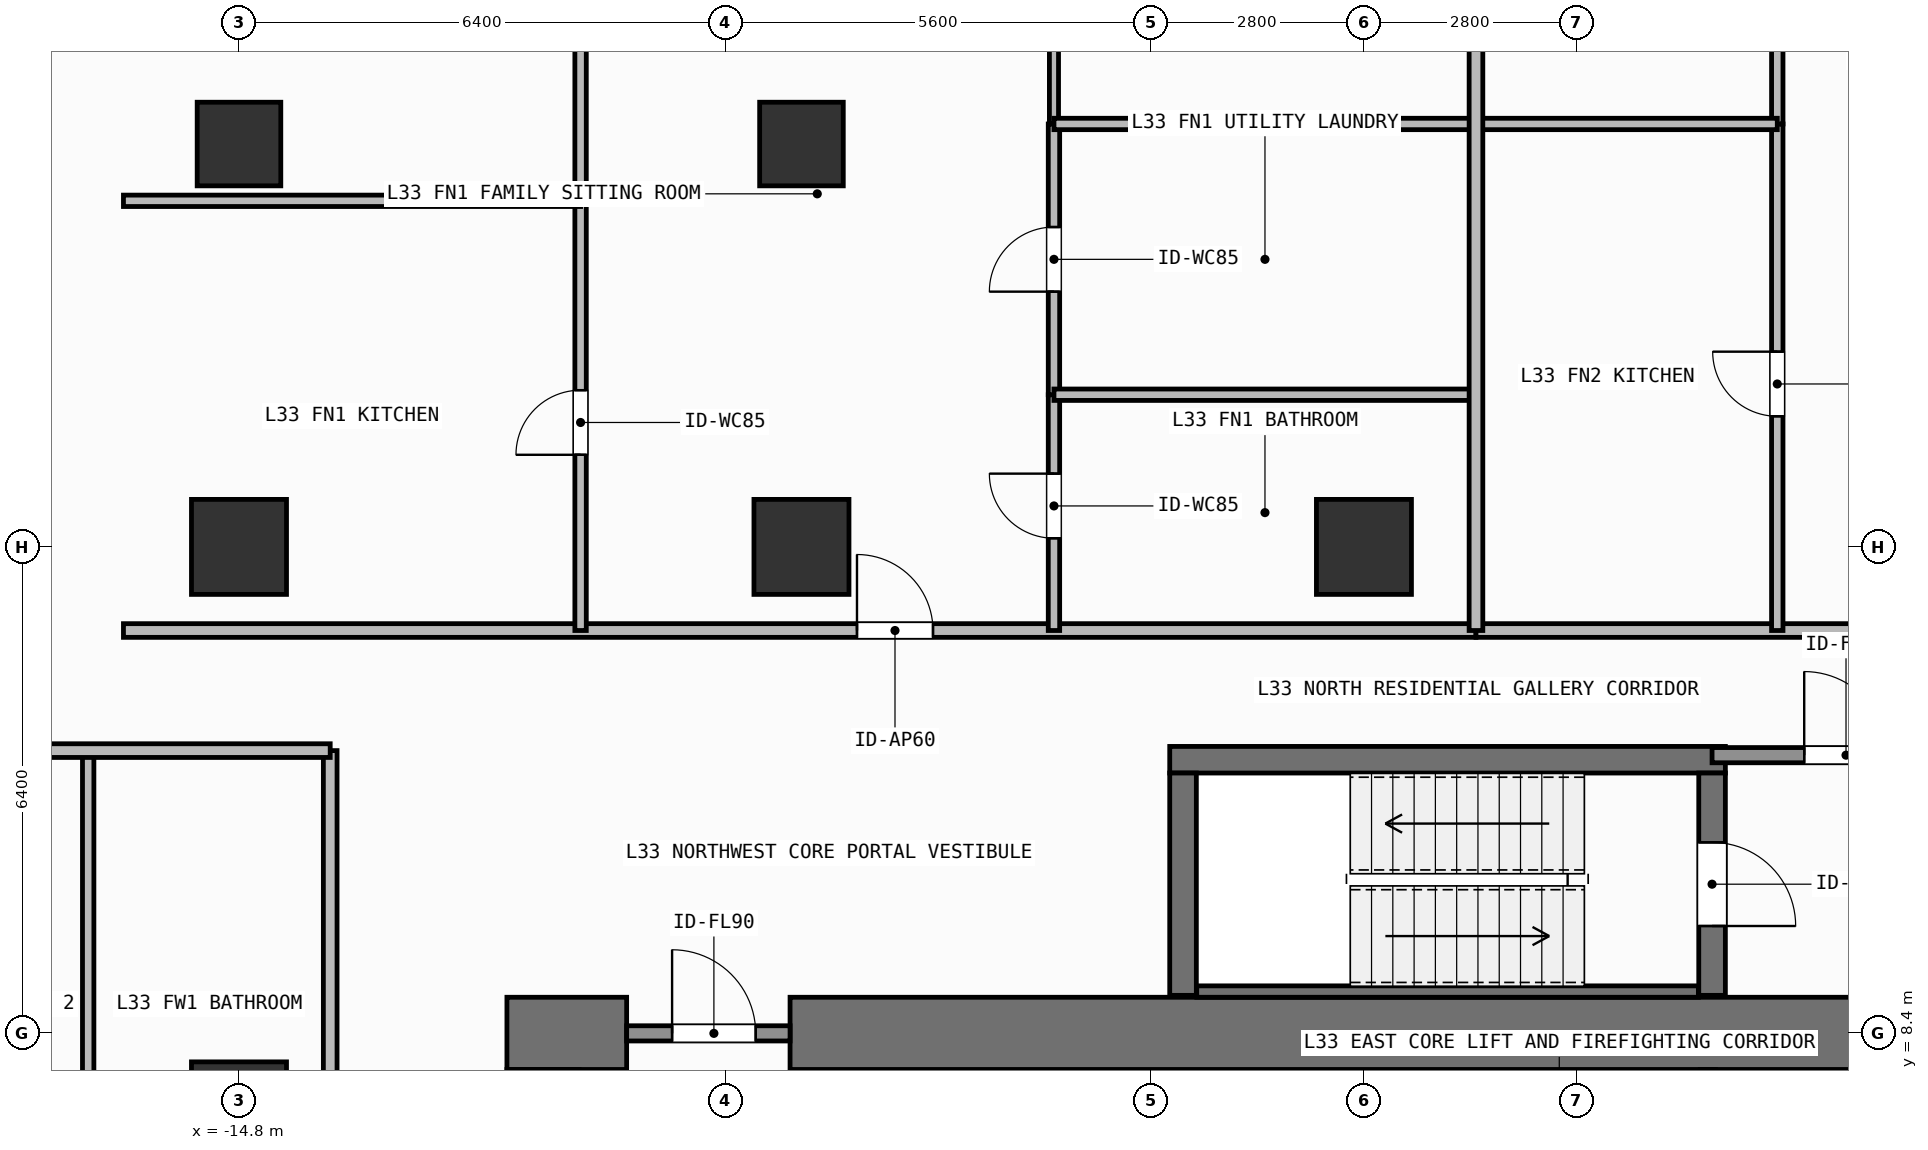
"""IFC4 building model, lengths in metres.
Left out: names, types, materials, properties, quantities, classifications, styles, units other than length and angle.
Written with IfcOpenShell. Run it as: python <this file> out.ifc"""

import sys

from ifc_helpers import new_model, si_unit, direction, frame, frame_2d, origin, origin_2d, place, context, subcontext, project, spatial, rectangle, extrude, element, fill, save


model = new_model("IFC4")
c1 = context("Model", 3, precision=1e-05, world=origin(), true_north=direction((0.0, 1.0)))
c2 = subcontext(c1, "Body", "Model", "MODEL_VIEW")
j1 = project(units=[si_unit("LENGTHUNIT", "METRE"), si_unit("PLANEANGLEUNIT", "RADIAN")], contexts=[c1])
p1 = place(None, origin())
s1 = spatial("IfcSite", under=j1, at=p1, CompositionType="ELEMENT")
p2 = place(p1, origin())
s2 = spatial("IfcBuilding", under=s1, at=p2, CompositionType="ELEMENT")
p3 = place(p2, frame((0.0, 0.0, 132.9)))
s3 = spatial("IfcBuildingStorey", under=s2, at=p3, CompositionType="ELEMENT", Elevation=132.9)
p4 = place(p3, frame((-11.275, 8.4, 0.0), z_axis=(0.0, 0.0, 1.0), x_axis=(1.0, 0.0, 0.0)))
e1 = element("IfcWall", 1, at=p4, inside=s3, PredefinedType="SHEAR", context=c2, shape_type="SweptSolid", body=[
    extrude(rectangle(XDim=1.575, YDim=0.95, at=frame_2d((0.788, 0.0))), origin(), (0.0, 0.0, 1.0), 3.9),
])
p5 = place(p3, frame((-7.55, 8.4, 0.0), z_axis=(0.0, 0.0, 1.0), x_axis=(1.0, 0.0, 0.0)))
e2 = element("IfcWall", 2, at=p5, inside=s3, PredefinedType="SHEAR", context=c2, shape_type="SweptSolid", body=[
    extrude(rectangle(XDim=16.425, YDim=0.95, at=frame_2d((8.212, 0.0))), origin(), (0.0, 0.0, 1.0), 3.9),
])
p6 = place(p3, frame((-10.8, -7.925, 0.0), z_axis=(0.0, 0.0, 1.0), x_axis=(0.0, 1.0, 0.0)))
e3 = element("IfcWall", 3, at=p6, inside=s3, PredefinedType="SHEAR", context=c2, shape_type="SweptSolid", body=[
    extrude(rectangle(XDim=15.85, YDim=0.95, at=frame_2d((7.925, 0.0))), origin(), (0.0, 0.0, 1.0), 3.9),
])
p7 = place(p3, frame((-2.555, 12.0, 0.0), z_axis=(0.0, 0.0, 1.0), x_axis=(1.0, 0.0, 0.0)))
e4 = element("IfcWall", 4, at=p7, inside=s3, PredefinedType="SHEAR", context=c2, shape_type="SweptSolid", body=[
    extrude(rectangle(XDim=7.31, YDim=0.35, at=frame_2d((3.655, 0.0))), origin(), (0.0, 0.0, 1.0), 3.9),
])
p8 = place(p3, frame((-2.2, 8.95, 0.0), z_axis=(0.0, 0.0, 1.0), x_axis=(1.0, 0.0, 0.0)))
e5 = element("IfcWall", 5, at=p8, inside=s3, PredefinedType="SHEAR", context=c2, shape_type="SweptSolid", body=[
    extrude(rectangle(XDim=6.6, YDim=0.15, at=frame_2d((3.3, 0.0))), origin(), (0.0, 0.0, 1.0), 3.9),
])
p9 = place(p3, frame((-2.38, 8.9, 0.0), z_axis=(0.0, 0.0, 1.0), x_axis=(0.0, 1.0, 0.0)))
e6 = element("IfcWall", 6, at=p9, inside=s3, PredefinedType="SHEAR", context=c2, shape_type="SweptSolid", body=[
    extrude(rectangle(XDim=2.925, YDim=0.35, at=frame_2d((1.462, 0.0))), origin(), (0.0, 0.0, 1.0), 3.9),
])
p10 = place(p3, frame((4.58, 11.825, 0.0), z_axis=(0.0, 0.0, 1.0), x_axis=(0.0, -1.0, 0.0)))
e7 = element("IfcWall", 7, at=p10, inside=s3, PredefinedType="SHEAR", context=c2, shape_type="SweptSolid", body=[
    extrude(rectangle(XDim=2.925, YDim=0.35, at=frame_2d((1.462, 0.0))), origin(), (0.0, 0.0, 1.0), 3.9),
])
p11 = place(p10, frame((0.913, 0.0, 0.0)))
e8 = element("IfcOpeningElement", 8, at=p11, cuts=e7, PredefinedType="OPENING", context=c2, shape_type="SweptSolid", body=[
    extrude(rectangle(XDim=1.1, YDim=2.15, at=frame_2d((0.55, 1.075))), frame((0.0, 0.185, 0.0), z_axis=(0.0, -1.0, 0.0), x_axis=(1.0, 0.0, 0.0)), (0.0, 0.0, 1.0), 0.37),
])
for number, where, z_axis, x_axis in (
    (9, (-14.8, 14.8, 0.0), (0.0, 0.0, 1.0), (1.0, 0.0, 0.0)),
    (10, (-7.4, 14.8, 0.0), (0.0, 0.0, 1.0), (1.0, 0.0, 0.0)),
    (11, (0.0, 14.8, 0.0), (0.0, 0.0, 1.0), (1.0, 0.0, 0.0)),
    (12, (-14.8, 7.4, 0.0), (0.0, 0.0, 1.0), (1.0, 0.0, 0.0)),
):
    element("IfcColumn", number, at=place(p3, frame(where, z_axis=z_axis, x_axis=x_axis)), inside=s3, PredefinedType="COLUMN", context=c2, shape_type="SweptSolid", body=[
        extrude(rectangle(XDim=1.25, YDim=1.25, at=origin_2d()), origin(), (0.0, 0.0, 1.0), 3.9),
    ])
for number, where, z_axis, x_axis in (
    (13, (-14.8, 20.1, 0.0), (0.0, 0.0, 1.0), (1.0, 0.0, 0.0)),
    (14, (-7.4, 20.1, 0.0), (0.0, 0.0, 1.0), (1.0, 0.0, 0.0)),
):
    element("IfcColumn", number, at=place(p3, frame(where, z_axis=z_axis, x_axis=x_axis)), inside=s3, PredefinedType="COLUMN", context=c2, shape_type="SweptSolid", body=[
        extrude(rectangle(XDim=1.1, YDim=1.1, at=origin_2d()), origin(), (0.0, 0.0, 1.0), 3.9),
    ])
p12 = place(p3, frame((4.525, 5.825, 0.0), z_axis=(0.0, 0.0, 1.0), x_axis=(0.0, 1.0, 0.0)))
e15 = element("IfcWall", 15, at=p12, inside=s3, PredefinedType="SHEAR", context=c2, shape_type="SweptSolid", body=[
    extrude(rectangle(XDim=2.1, YDim=0.2, at=frame_2d((1.05, 0.0))), origin(), (0.0, 0.0, 1.0), 3.62),
])
p13 = place(p12, frame((0.425, 0.0, 0.0)))
e16 = element("IfcOpeningElement", 16, at=p13, cuts=e15, PredefinedType="OPENING", context=c2, shape_type="SweptSolid", body=[
    extrude(rectangle(XDim=1.1, YDim=2.2, at=frame_2d((0.55, 1.1))), frame((0.0, 0.11, 0.0), z_axis=(0.0, -1.0, 0.0), x_axis=(1.0, 0.0, 0.0)), (0.0, 0.0, 1.0), 0.22),
])
p14 = place(p3, frame((4.58, 12.06, 0.0), z_axis=(0.0, 0.0, 1.0), x_axis=(1.0, 0.0, 0.0)))
e17 = element("IfcWall", 17, at=p14, inside=s3, PredefinedType="SOLIDWALL", context=c2, shape_type="SweptSolid", body=[
    extrude(rectangle(XDim=3.7, YDim=0.2, at=frame_2d((1.85, 0.0))), origin(), (0.0, 0.0, 1.0), 3.62),
])
p15 = place(p14, frame((1.212, 0.0, 0.0)))
e18 = element("IfcOpeningElement", 18, at=p15, cuts=e17, PredefinedType="OPENING", context=c2, shape_type="SweptSolid", body=[
    extrude(rectangle(XDim=1.1, YDim=2.15, at=frame_2d((0.55, 1.075))), frame((0.0, 0.11, 0.0), z_axis=(0.0, -1.0, 0.0), x_axis=(1.0, 0.0, 0.0)), (0.0, 0.0, 1.0), 0.22),
])
p16 = place(p3, frame((-9.7, 8.4, 0.0), z_axis=(0.0, 0.0, 1.0), x_axis=(1.0, 0.0, 0.0)))
e19 = element("IfcWall", 19, at=p16, inside=s3, PredefinedType="SOLIDWALL", context=c2, shape_type="SweptSolid", body=[
    extrude(rectangle(XDim=2.15, YDim=0.2, at=frame_2d((1.075, 0.0))), origin(), (0.0, 0.0, 1.0), 2.66),
])
p17 = place(p16, frame((0.598, 0.0, 0.0)))
e20 = element("IfcOpeningElement", 20, at=p17, cuts=e19, PredefinedType="OPENING", context=c2, shape_type="SweptSolid", body=[
    extrude(rectangle(XDim=1.1, YDim=2.15, at=frame_2d((0.55, 1.075))), frame((0.0, 0.11, 0.0), z_axis=(0.0, -1.0, 0.0), x_axis=(1.0, 0.0, 0.0)), (0.0, 0.0, 1.0), 0.22),
])
p18 = place(p3, frame((-16.32, 13.7, 0.0), z_axis=(0.0, 0.0, 1.0), x_axis=(1.0, 0.0, 0.0)))
e21 = element("IfcWall", 21, at=p18, inside=s3, PredefinedType="PARTITIONING", context=c2, shape_type="SweptSolid", body=[
    extrude(rectangle(XDim=17.794, YDim=0.18, at=frame_2d((8.897, 0.0))), origin(), (0.0, 0.0, 1.0), 3.62),
])
p19 = place(p18, frame((9.65, 0.0, 0.0)))
e22 = element("IfcOpeningElement", 22, at=p19, cuts=e21, PredefinedType="OPENING", context=c2, shape_type="SweptSolid", body=[
    extrude(rectangle(XDim=1.0, YDim=2.2, at=frame_2d((0.5, 1.1))), frame((0.0, 0.1, 0.0), z_axis=(0.0, -1.0, 0.0), x_axis=(1.0, 0.0, 0.0)), (0.0, 0.0, 1.0), 0.2),
])
p20 = place(p3, frame((-10.306, 13.7, 0.0), z_axis=(0.0, 0.0, 1.0), x_axis=(0.0, 1.0, 0.0)))
e23 = element("IfcWall", 23, at=p20, inside=s3, PredefinedType="PARTITIONING", context=c2, shape_type="SweptSolid", body=[
    extrude(rectangle(XDim=5.653, YDim=0.15, at=frame_2d((2.827, 0.0))), origin(), (0.0, 0.0, 1.0), 3.62),
])
p21 = place(p20, frame((2.312, 0.0, 0.0)))
e24 = element("IfcOpeningElement", 24, at=p21, cuts=e23, PredefinedType="OPENING", context=c2, shape_type="SweptSolid", body=[
    extrude(rectangle(XDim=0.85, YDim=2.1, at=frame_2d((0.425, 1.05))), frame((0.0, 0.085, 0.0), z_axis=(0.0, -1.0, 0.0), x_axis=(1.0, 0.0, 0.0)), (0.0, 0.0, 1.0), 0.17),
])
p22 = place(p3, frame((-10.306, 19.353, 0.0), z_axis=(0.0, 0.0, 1.0), x_axis=(0.0, 1.0, 0.0)))
e25 = element("IfcWall", 25, at=p22, inside=s3, PredefinedType="PARTITIONING", context=c2, shape_type="SweptSolid", body=[
    extrude(rectangle(XDim=5.837, YDim=0.15, at=frame_2d((2.918, 0.0))), origin(), (0.0, 0.0, 1.0), 3.62),
])
p23 = place(p22, frame((2.493, 0.0, 0.0)))
e26 = element("IfcOpeningElement", 26, at=p23, cuts=e25, PredefinedType="OPENING", context=c2, shape_type="SweptSolid", body=[
    extrude(rectangle(XDim=0.85, YDim=2.1, at=frame_2d((0.425, 1.05))), frame((0.0, 0.085, 0.0), z_axis=(0.0, -1.0, 0.0), x_axis=(1.0, 0.0, 0.0)), (0.0, 0.0, 1.0), 0.17),
])
p24 = place(p3, frame((-4.078, 13.7, 0.0), z_axis=(0.0, 0.0, 1.0), x_axis=(0.0, 1.0, 0.0)))
e27 = element("IfcWall", 27, at=p24, inside=s3, PredefinedType="PARTITIONING", context=c2, shape_type="SweptSolid", body=[
    extrude(rectangle(XDim=3.102, YDim=0.15, at=frame_2d((1.551, 0.0))), origin(), (0.0, 0.0, 1.0), 3.62),
])
p25 = place(p24, frame((1.214, 0.0, 0.0)))
e28 = element("IfcOpeningElement", 28, at=p25, cuts=e27, PredefinedType="OPENING", context=c2, shape_type="SweptSolid", body=[
    extrude(rectangle(XDim=0.85, YDim=2.1, at=frame_2d((0.425, 1.05))), frame((0.0, 0.085, 0.0), z_axis=(0.0, -1.0, 0.0), x_axis=(1.0, 0.0, 0.0)), (0.0, 0.0, 1.0), 0.17),
])
p26 = place(p3, frame((-4.078, 16.802, 0.0), z_axis=(0.0, 0.0, 1.0), x_axis=(0.0, 1.0, 0.0)))
e29 = element("IfcWall", 29, at=p26, inside=s3, PredefinedType="PARTITIONING", context=c2, shape_type="SweptSolid", body=[
    extrude(rectangle(XDim=3.562, YDim=0.15, at=frame_2d((1.781, 0.0))), origin(), (0.0, 0.0, 1.0), 3.62),
])
p27 = place(p26, frame((1.356, 0.0, 0.0)))
e30 = element("IfcOpeningElement", 30, at=p27, cuts=e29, PredefinedType="OPENING", context=c2, shape_type="SweptSolid", body=[
    extrude(rectangle(XDim=0.85, YDim=2.1, at=frame_2d((0.425, 1.05))), frame((0.0, 0.085, 0.0), z_axis=(0.0, -1.0, 0.0), x_axis=(1.0, 0.0, 0.0)), (0.0, 0.0, 1.0), 0.17),
])
p28 = place(p3, frame((-4.078, 20.364, 0.0), z_axis=(0.0, 0.0, 1.0), x_axis=(0.0, 1.0, 0.0)))
e31 = element("IfcWall", 31, at=p28, inside=s3, PredefinedType="PARTITIONING", context=c2, shape_type="SweptSolid", body=[
    extrude(rectangle(XDim=4.826, YDim=0.12, at=frame_2d((2.413, 0.0))), origin(), (0.0, 0.0, 1.0), 3.62),
])
p29 = place(p28, frame((1.901, 0.0, 0.0)))
e32 = element("IfcOpeningElement", 32, at=p29, cuts=e31, PredefinedType="OPENING", context=c2, shape_type="SweptSolid", body=[
    extrude(rectangle(XDim=0.85, YDim=2.1, at=frame_2d((0.425, 1.05))), frame((0.0, 0.07, 0.0), z_axis=(0.0, -1.0, 0.0), x_axis=(1.0, 0.0, 0.0)), (0.0, 0.0, 1.0), 0.14),
])
p30 = place(p3, frame((1.474, 13.7, 0.0), z_axis=(0.0, 0.0, 1.0), x_axis=(1.0, 0.0, 0.0)))
e33 = element("IfcWall", 33, at=p30, inside=s3, PredefinedType="PARTITIONING", context=c2, shape_type="SweptSolid", body=[
    extrude(rectangle(XDim=22.646, YDim=0.18, at=frame_2d((11.323, 0.0))), origin(), (0.0, 0.0, 1.0), 3.62),
])
p31 = place(p30, frame((10.196, 0.0, 0.0)))
e34 = element("IfcOpeningElement", 34, at=p31, cuts=e33, PredefinedType="OPENING", context=c2, shape_type="SweptSolid", body=[
    extrude(rectangle(XDim=1.0, YDim=2.2, at=frame_2d((0.5, 1.1))), frame((0.0, 0.1, 0.0), z_axis=(0.0, -1.0, 0.0), x_axis=(1.0, 0.0, 0.0)), (0.0, 0.0, 1.0), 0.2),
])
p32 = place(p3, frame((5.438, 13.7, 0.0), z_axis=(0.0, 0.0, 1.0), x_axis=(0.0, 1.0, 0.0)))
e35 = element("IfcWall", 35, at=p32, inside=s3, PredefinedType="PARTITIONING", context=c2, shape_type="SweptSolid", body=[
    extrude(rectangle(XDim=6.664, YDim=0.15, at=frame_2d((3.332, 0.0))), origin(), (0.0, 0.0, 1.0), 3.62),
])
p33 = place(p32, frame((2.818, 0.0, 0.0)))
e36 = element("IfcOpeningElement", 36, at=p33, cuts=e35, PredefinedType="OPENING", context=c2, shape_type="SweptSolid", body=[
    extrude(rectangle(XDim=0.85, YDim=2.1, at=frame_2d((0.425, 1.05))), frame((0.0, 0.085, 0.0), z_axis=(0.0, -1.0, 0.0), x_axis=(1.0, 0.0, 0.0)), (0.0, 0.0, 1.0), 0.17),
])
p34 = place(p3, frame((5.438, 20.364, 0.0), z_axis=(0.0, 0.0, 1.0), x_axis=(0.0, 1.0, 0.0)))
e37 = element("IfcWall", 37, at=p34, inside=s3, PredefinedType="PARTITIONING", context=c2, shape_type="SweptSolid", body=[
    extrude(rectangle(XDim=4.826, YDim=0.15, at=frame_2d((2.413, 0.0))), origin(), (0.0, 0.0, 1.0), 3.62),
])
p35 = place(p34, frame((2.946, 0.0, 0.0)))
e38 = element("IfcOpeningElement", 38, at=p35, cuts=e37, PredefinedType="OPENING", context=c2, shape_type="SweptSolid", body=[
    extrude(rectangle(XDim=0.85, YDim=2.1, at=frame_2d((0.425, 1.05))), frame((0.0, 0.085, 0.0), z_axis=(0.0, -1.0, 0.0), x_axis=(1.0, 0.0, 0.0)), (0.0, 0.0, 1.0), 0.17),
])
p36 = place(p3, frame((-13.6, -12.12, 0.0), z_axis=(0.0, 0.0, 1.0), x_axis=(0.0, 1.0, 0.0)))
e39 = element("IfcWall", 39, at=p36, inside=s3, PredefinedType="PARTITIONING", context=c2, shape_type="SweptSolid", body=[
    extrude(rectangle(XDim=24.24, YDim=0.18, at=frame_2d((12.12, 0.0))), origin(), (0.0, 0.0, 1.0), 3.62),
])
p37 = place(p36, frame((11.62, 0.0, 0.0)))
e40 = element("IfcOpeningElement", 40, at=p37, cuts=e39, PredefinedType="OPENING", context=c2, shape_type="SweptSolid", body=[
    extrude(rectangle(XDim=1.0, YDim=2.2, at=frame_2d((0.5, 1.1))), frame((0.0, 0.1, 0.0), z_axis=(0.0, -1.0, 0.0), x_axis=(1.0, 0.0, 0.0)), (0.0, 0.0, 1.0), 0.2),
])
p38 = place(p3, frame((-16.32, 19.353, 0.0), z_axis=(0.0, 0.0, 1.0), x_axis=(1.0, 0.0, 0.0)))
e41 = element("IfcWall", 41, at=p38, inside=s3, PredefinedType="PARTITIONING", context=c2, shape_type="SweptSolid", body=[
    extrude(rectangle(XDim=6.014, YDim=0.15, at=frame_2d((3.007, 0.0))), origin(), (0.0, 0.0, 1.0), 3.31),
])
p39 = place(p3, frame((-4.078, 16.802, 0.0), z_axis=(0.0, 0.0, 1.0), x_axis=(1.0, 0.0, 0.0)))
e42 = element("IfcWall", 42, at=p39, inside=s3, PredefinedType="PARTITIONING", context=c2, shape_type="SweptSolid", body=[
    extrude(rectangle(XDim=5.552, YDim=0.15, at=frame_2d((2.776, 0.0))), origin(), (0.0, 0.0, 1.0), 3.62),
])
p40 = place(p3, frame((-4.078, 20.364, 0.0), z_axis=(0.0, 0.0, 1.0), x_axis=(1.0, 0.0, 0.0)))
e43 = element("IfcWall", 43, at=p40, inside=s3, PredefinedType="PARTITIONING", context=c2, shape_type="SweptSolid", body=[
    extrude(rectangle(XDim=5.552, YDim=0.15, at=frame_2d((2.776, 0.0))), origin(), (0.0, 0.0, 1.0), 2.71),
])
p41 = place(p3, frame((1.474, 20.364, 0.0), z_axis=(0.0, 0.0, 1.0), x_axis=(1.0, 0.0, 0.0)))
e44 = element("IfcWall", 44, at=p41, inside=s3, PredefinedType="PARTITIONING", context=c2, shape_type="SweptSolid", body=[
    extrude(rectangle(XDim=3.964, YDim=0.15, at=frame_2d((1.982, 0.0))), origin(), (0.0, 0.0, 1.0), 2.71),
])
p42 = place(p3, frame((1.474, 13.7, 0.0), z_axis=(0.0, 0.0, 1.0), x_axis=(0.0, 1.0, 0.0)))
e45 = element("IfcWall", 45, at=p42, inside=s3, PredefinedType="PARTITIONING", context=c2, shape_type="SweptSolid", body=[
    extrude(rectangle(XDim=15.73, YDim=0.18, at=frame_2d((7.865, 0.0))), origin(), (0.0, 0.0, 1.0), 3.62),
])
p43 = place(p3, frame((-16.784, 5.449, 0.0), z_axis=(0.0, 0.0, 1.0), x_axis=(0.0, 1.0, 0.0)))
e46 = element("IfcWall", 46, at=p43, inside=s3, PredefinedType="PARTITIONING", context=c2, shape_type="SweptSolid", body=[
    extrude(rectangle(XDim=6.671, YDim=0.15, at=frame_2d((3.335, 0.0))), origin(), (0.0, 0.0, 1.0), 3.62),
])
p44 = place(p3, frame((-19.73, 12.12, 0.0), z_axis=(0.0, 0.0, 1.0), x_axis=(1.0, 0.0, 0.0)))
e47 = element("IfcWall", 47, at=p44, inside=s3, PredefinedType="PARTITIONING", context=c2, shape_type="SweptSolid", body=[
    extrude(rectangle(XDim=6.13, YDim=0.18, at=frame_2d((3.065, 0.0))), origin(), (0.0, 0.0, 1.0), 3.62),
])
p45 = place(p11, origin())
e48 = element("IfcDoor", 48, at=p45, inside=s3, OperationType="SINGLE_SWING_RIGHT", PredefinedType="DOOR", context=c2, shape_type="SweptSolid", body=[
    extrude(rectangle(XDim=1.1, YDim=2.15, at=frame_2d((0.55, 1.075))), frame((0.0, 0.025, 0.0), z_axis=(0.0, -1.0, 0.0), x_axis=(1.0, 0.0, 0.0)), (0.0, 0.0, 1.0), 0.05),
])
fill(e8, e48)
p46 = place(p15, origin())
e49 = element("IfcDoor", 49, at=p46, inside=s3, OperationType="SINGLE_SWING_LEFT", PredefinedType="DOOR", context=c2, shape_type="SweptSolid", body=[
    extrude(rectangle(XDim=1.1, YDim=2.15, at=frame_2d((0.55, 1.075))), frame((0.0, 0.025, 0.0), z_axis=(0.0, -1.0, 0.0), x_axis=(1.0, 0.0, 0.0)), (0.0, 0.0, 1.0), 0.05),
])
fill(e18, e49)
p47 = place(p17, origin())
e50 = element("IfcDoor", 50, at=p47, inside=s3, OperationType="SINGLE_SWING_LEFT", PredefinedType="DOOR", context=c2, shape_type="SweptSolid", body=[
    extrude(rectangle(XDim=1.1, YDim=2.15, at=frame_2d((0.55, 1.075))), frame((0.0, 0.025, 0.0), z_axis=(0.0, -1.0, 0.0), x_axis=(1.0, 0.0, 0.0)), (0.0, 0.0, 1.0), 0.05),
])
fill(e20, e50)
p48 = place(p19, origin())
e51 = element("IfcDoor", 51, at=p48, inside=s3, OperationType="SINGLE_SWING_LEFT", PredefinedType="DOOR", context=c2, shape_type="SweptSolid", body=[
    extrude(rectangle(XDim=1.0, YDim=2.2, at=frame_2d((0.5, 1.1))), frame((0.0, 0.025, 0.0), z_axis=(0.0, -1.0, 0.0), x_axis=(1.0, 0.0, 0.0)), (0.0, 0.0, 1.0), 0.05),
])
fill(e22, e51)
p49 = place(p21, origin())
e52 = element("IfcDoor", 52, at=p49, inside=s3, OperationType="SINGLE_SWING_LEFT", PredefinedType="DOOR", context=c2, shape_type="SweptSolid", body=[
    extrude(rectangle(XDim=0.85, YDim=2.1, at=frame_2d((0.425, 1.05))), frame((0.0, 0.025, 0.0), z_axis=(0.0, -1.0, 0.0), x_axis=(1.0, 0.0, 0.0)), (0.0, 0.0, 1.0), 0.05),
])
fill(e24, e52)
p50 = place(p25, origin())
e53 = element("IfcDoor", 53, at=p50, inside=s3, OperationType="SINGLE_SWING_RIGHT", PredefinedType="DOOR", context=c2, shape_type="SweptSolid", body=[
    extrude(rectangle(XDim=0.85, YDim=2.1, at=frame_2d((0.425, 1.05))), frame((0.0, 0.025, 0.0), z_axis=(0.0, -1.0, 0.0), x_axis=(1.0, 0.0, 0.0)), (0.0, 0.0, 1.0), 0.05),
])
fill(e28, e53)
p51 = place(p27, origin())
e54 = element("IfcDoor", 54, at=p51, inside=s3, OperationType="SINGLE_SWING_LEFT", PredefinedType="DOOR", context=c2, shape_type="SweptSolid", body=[
    extrude(rectangle(XDim=0.85, YDim=2.1, at=frame_2d((0.425, 1.05))), frame((0.0, 0.025, 0.0), z_axis=(0.0, -1.0, 0.0), x_axis=(1.0, 0.0, 0.0)), (0.0, 0.0, 1.0), 0.05),
])
fill(e30, e54)
p52 = place(p33, origin())
e55 = element("IfcDoor", 55, at=p52, inside=s3, OperationType="SINGLE_SWING_RIGHT", PredefinedType="DOOR", context=c2, shape_type="SweptSolid", body=[
    extrude(rectangle(XDim=0.85, YDim=2.1, at=frame_2d((0.425, 1.05))), frame((0.0, 0.025, 0.0), z_axis=(0.0, -1.0, 0.0), x_axis=(1.0, 0.0, 0.0)), (0.0, 0.0, 1.0), 0.05),
])
fill(e36, e55)
save(model, sys.argv[1])
